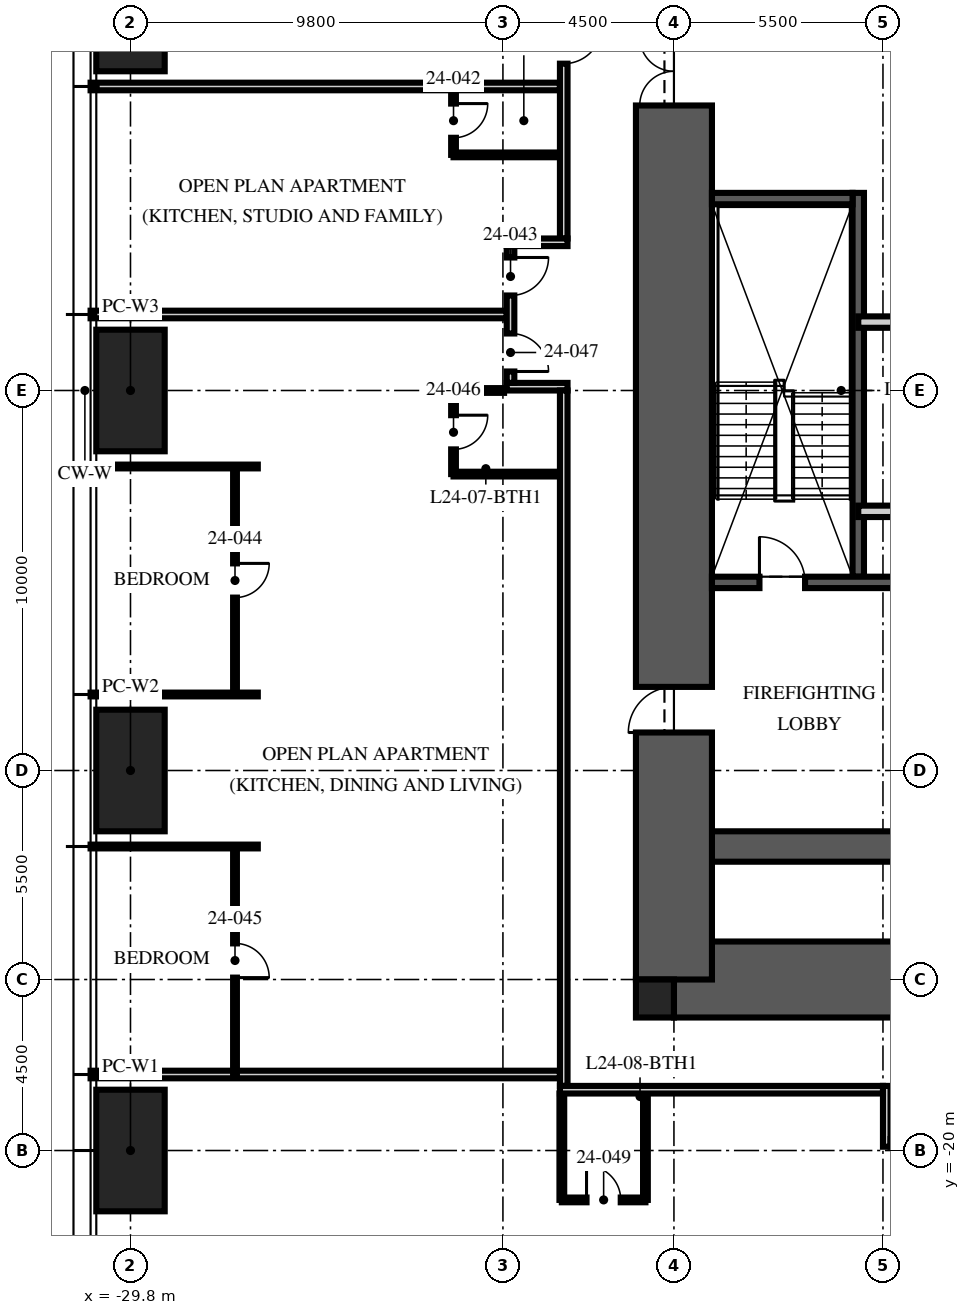
"""IFC4 building model, lengths in metres.
Left out: names, types, materials, properties, quantities, classifications, styles, units other than length and angle.
Written with IfcOpenShell. Run it as: python <this file> out.ifc"""

import sys

from ifc_helpers import new_model, si_unit, direction, frame, frame_2d, origin, origin_2d, place, context, subcontext, project, spatial, rectangle, hollow_rectangle, extrude, element, fill, save


model = new_model("IFC4")
c1 = context("Model", 3, precision=1e-05, world=origin(), true_north=direction((0.0, 1.0)))
c2 = subcontext(c1, "Body", "Model", "MODEL_VIEW")
j1 = project(units=[si_unit("LENGTHUNIT", "METRE"), si_unit("PLANEANGLEUNIT", "RADIAN")], contexts=[c1])
p1 = place(None, origin())
s1 = spatial("IfcSite", under=j1, at=p1, CompositionType="ELEMENT")
p2 = place(p1, origin())
s2 = spatial("IfcBuilding", under=s1, at=p2, CompositionType="ELEMENT")
p3 = place(p2, frame((0.0, 0.0, 96.0)))
s3 = spatial("IfcBuildingStorey", under=s2, at=p3, CompositionType="ELEMENT", Elevation=96.0)
p4 = place(p3, frame((-15.5, -15.5, -0.25), z_axis=(0.0, 0.0, 1.0), x_axis=(1.0, 0.0, 0.0)))
e1 = element("IfcWall", 1, at=p4, inside=s3, PredefinedType="SHEAR", context=c2, shape_type="SweptSolid", body=[
    extrude(rectangle(XDim=31.0, YDim=2.0, at=frame_2d((15.5, 0.0))), origin(), (0.0, 0.0, 1.0), 3.65),
])
p5 = place(p3, frame((-15.5, -12.0, -0.25), z_axis=(0.0, 0.0, 1.0), x_axis=(1.0, 0.0, 0.0)))
e2 = element("IfcWall", 2, at=p5, inside=s3, PredefinedType="SHEAR", context=c2, shape_type="SweptSolid", body=[
    extrude(rectangle(XDim=31.0, YDim=0.8, at=frame_2d((15.5, 0.0))), origin(), (0.0, 0.0, 1.0), 3.65),
])
p6 = place(p3, frame((-15.5, -15.5, -0.25), z_axis=(0.0, 0.0, 1.0), x_axis=(0.0, 1.0, 0.0)))
e3 = element("IfcWall", 3, at=p6, inside=s3, PredefinedType="SHEAR", context=c2, shape_type="SweptSolid", body=[
    extrude(rectangle(XDim=31.0, YDim=2.0, at=frame_2d((15.5, 0.0))), origin(), (0.0, 0.0, 1.0), 3.65),
])
p7 = place(p6, frame((6.5, 0.0, 0.25)))
e4 = element("IfcOpeningElement", 4, at=p7, cuts=e3, PredefinedType="OPENING", context=c2, shape_type="SweptSolid", body=[
    extrude(rectangle(XDim=1.2, YDim=2.1, at=frame_2d((0.6, 1.05))), frame((0.0, 1.01, 0.0), z_axis=(0.0, -1.0, 0.0), x_axis=(1.0, 0.0, 0.0)), (0.0, 0.0, 1.0), 2.02),
])
p8 = place(p6, frame((23.0, 0.0, 0.25)))
e5 = element("IfcOpeningElement", 5, at=p8, cuts=e3, PredefinedType="OPENING", context=c2, shape_type="SweptSolid", body=[
    extrude(rectangle(XDim=1.8, YDim=2.1, at=frame_2d((0.9, 1.05))), frame((0.0, 1.01, 0.0), z_axis=(0.0, -1.0, 0.0), x_axis=(1.0, 0.0, 0.0)), (0.0, 0.0, 1.0), 2.02),
])
p9 = place(p3, frame((-16.0, -16.0, -0.25), z_axis=(0.0, 0.0, 1.0), x_axis=(1.0, 0.0, 0.0)))
e6 = element("IfcColumn", 6, at=p9, inside=s3, PredefinedType="COLUMN", context=c2, shape_type="SweptSolid", body=[
    extrude(rectangle(XDim=1.0, YDim=1.0, at=origin_2d()), origin(), (0.0, 0.0, 1.0), 3.65),
])
p10 = place(p3, frame((-29.8, -20.0, 0.0), z_axis=(0.0, 0.0, 1.0), x_axis=(0.0, 1.0, 0.0)))
e7 = element("IfcColumn", 7, at=p10, inside=s3, PredefinedType="COLUMN", context=c2, shape_type="SweptSolid", body=[
    extrude(hollow_rectangle(XDim=3.2, YDim=1.8, WallThickness=0.2, at=origin_2d()), origin(), (0.0, 0.0, 1.0), 2.47),
])
p11 = place(p3, frame((-29.8, -10.0, 0.0), z_axis=(0.0, 0.0, 1.0), x_axis=(0.0, 1.0, 0.0)))
e8 = element("IfcColumn", 8, at=p11, inside=s3, PredefinedType="COLUMN", context=c2, shape_type="SweptSolid", body=[
    extrude(hollow_rectangle(XDim=3.2, YDim=1.8, WallThickness=0.2, at=origin_2d()), origin(), (0.0, 0.0, 1.0), 2.62),
])
p12 = place(p3, frame((-29.8, 0.0, 0.0), z_axis=(0.0, 0.0, 1.0), x_axis=(0.0, 1.0, 0.0)))
e9 = element("IfcColumn", 9, at=p12, inside=s3, PredefinedType="COLUMN", context=c2, shape_type="SweptSolid", body=[
    extrude(hollow_rectangle(XDim=3.2, YDim=1.8, WallThickness=0.2, at=origin_2d()), origin(), (0.0, 0.0, 1.0), 2.78),
])
p13 = place(p3, frame((-29.8, 10.0, 0.0), z_axis=(0.0, 0.0, 1.0), x_axis=(0.0, 1.0, 0.0)))
e10 = element("IfcColumn", 10, at=p13, inside=s3, PredefinedType="COLUMN", context=c2, shape_type="SweptSolid", body=[
    extrude(hollow_rectangle(XDim=3.2, YDim=1.8, WallThickness=0.2, at=origin_2d()), origin(), (0.0, 0.0, 1.0), 2.62),
])
p14 = place(p3, frame((-10.65, -4.9, 0.0), z_axis=(0.0, 0.0, 1.0), x_axis=(0.0, 1.0, 0.0)))
e11 = element("IfcWall", 11, at=p14, inside=s3, PredefinedType="SOLIDWALL", context=c2, shape_type="SweptSolid", body=[
    extrude(rectangle(XDim=10.1, YDim=0.3, at=frame_2d((5.05, 0.0))), origin(), (0.0, 0.0, 1.0), 3.4),
])
p15 = place(p3, frame((-14.5, -5.05, 0.0), z_axis=(0.0, 0.0, 1.0), x_axis=(1.0, 0.0, 0.0)))
e12 = element("IfcWall", 12, at=p15, inside=s3, PredefinedType="SOLIDWALL", context=c2, shape_type="SweptSolid", body=[
    extrude(rectangle(XDim=5.7, YDim=0.3, at=frame_2d((2.85, 0.0))), origin(), (0.0, 0.0, 1.0), 3.4),
])
p16 = place(p15, frame((1.25, 0.0, 0.0)))
e13 = element("IfcOpeningElement", 13, at=p16, cuts=e12, PredefinedType="OPENING", context=c2, shape_type="SweptSolid", body=[
    extrude(rectangle(XDim=1.2, YDim=2.1, at=frame_2d((0.6, 1.05))), frame((0.0, 0.16, 0.0), z_axis=(0.0, -1.0, 0.0), x_axis=(1.0, 0.0, 0.0)), (0.0, 0.0, 1.0), 0.32),
])
p17 = place(p3, frame((-14.5, 5.05, 0.0), z_axis=(0.0, 0.0, 1.0), x_axis=(1.0, 0.0, 0.0)))
e14 = element("IfcWall", 14, at=p17, inside=s3, PredefinedType="SOLIDWALL", context=c2, shape_type="SweptSolid", body=[
    extrude(rectangle(XDim=3.7, YDim=0.3, at=frame_2d((1.85, 0.0))), origin(), (0.0, 0.0, 1.0), 3.4),
])
p18 = place(p3, frame((-10.65, 1.8, 0.0), z_axis=(0.0, 0.0, 1.0), x_axis=(1.0, 0.0, 0.0)))
e15 = element("IfcWall", 15, at=p18, inside=s3, PredefinedType="PARTITIONING", context=c2, shape_type="SweptSolid", body=[
    extrude(rectangle(XDim=21.3, YDim=0.3, at=frame_2d((10.65, 0.0))), origin(), (0.0, 0.0, 1.0), 3.4),
])
p19 = place(p18, frame((10.05, 0.0, 0.0)))
e16 = element("IfcOpeningElement", 16, at=p19, cuts=e15, PredefinedType="OPENING", context=c2, shape_type="SweptSolid", body=[
    extrude(rectangle(XDim=1.2, YDim=2.1, at=frame_2d((0.6, 1.05))), frame((0.0, 0.16, 0.0), z_axis=(0.0, -1.0, 0.0), x_axis=(1.0, 0.0, 0.0)), (0.0, 0.0, 1.0), 0.32),
])
p20 = place(p18, frame((19.238, 0.0, 0.0)))
e17 = element("IfcOpeningElement", 17, at=p20, cuts=e15, PredefinedType="OPENING", context=c2, shape_type="SweptSolid", body=[
    extrude(rectangle(XDim=0.9, YDim=2.1, at=frame_2d((0.45, 1.05))), frame((0.0, 0.16, 0.0), z_axis=(0.0, -1.0, 0.0), x_axis=(1.0, 0.0, 0.0)), (0.0, 0.0, 1.0), 0.32),
])
p21 = place(p3, frame((-10.65, -3.18, 0.0), z_axis=(0.0, 0.0, 1.0), x_axis=(1.0, 0.0, 0.0)))
e18 = element("IfcWall", 18, at=p21, inside=s3, PredefinedType="PARTITIONING", context=c2, shape_type="SweptSolid", body=[
    extrude(rectangle(XDim=6.45, YDim=0.3, at=frame_2d((3.225, 0.0))), origin(), (0.0, 0.0, 1.0), 3.4),
])
p22 = place(p3, frame((-18.5, 8.0, 0.0), z_axis=(0.0, 0.0, 1.0), x_axis=(-1.0, 0.0, 0.0)))
e19 = element("IfcWall", 19, at=p22, inside=s3, PredefinedType="PARTITIONING", context=c2, shape_type="SweptSolid", body=[
    extrude(rectangle(XDim=12.35, YDim=0.2, at=frame_2d((6.175, 0.0))), origin(), (0.0, 0.0, 1.0), 2.7),
])
p23 = place(p3, frame((-19.9, 2.0, 0.0), z_axis=(0.0, 0.0, 1.0), x_axis=(-1.0, 0.0, 0.0)))
e20 = element("IfcWall", 20, at=p23, inside=s3, PredefinedType="PARTITIONING", context=c2, shape_type="SweptSolid", body=[
    extrude(rectangle(XDim=10.95, YDim=0.2, at=frame_2d((5.475, 0.0))), origin(), (0.0, 0.0, 1.0), 2.7),
])
for number, where, z_axis, x_axis in (
    (21, (-26.45, -2.0, 0.0), (0.0, 0.0, 1.0), (-1.0, 0.0, 0.0)),
    (22, (-26.45, -8.0, 0.0), (0.0, 0.0, 1.0), (-1.0, 0.0, 0.0)),
    (23, (-26.45, -12.0, 0.0), (0.0, 0.0, 1.0), (-1.0, 0.0, 0.0)),
):
    element("IfcWall", number, at=place(p3, frame(where, z_axis=z_axis, x_axis=x_axis)), inside=s3, PredefinedType="PARTITIONING", context=c2, shape_type="SweptSolid", body=[
        extrude(rectangle(XDim=4.4, YDim=0.1, at=frame_2d((2.2, 0.0))), origin(), (0.0, 0.0, 1.0), 2.7),
    ])
p24 = place(p3, frame((-18.5, -18.0, 0.0), z_axis=(0.0, 0.0, 1.0), x_axis=(-1.0, 0.0, 0.0)))
e24 = element("IfcWall", 24, at=p24, inside=s3, PredefinedType="PARTITIONING", context=c2, shape_type="SweptSolid", body=[
    extrude(rectangle(XDim=12.35, YDim=0.2, at=frame_2d((6.175, 0.0))), origin(), (0.0, 0.0, 1.0), 2.3),
])
p25 = place(p3, frame((-21.3, 8.0, 0.0), z_axis=(0.0, 0.0, 1.0), x_axis=(0.0, -1.0, 0.0)))
e25 = element("IfcWall", 25, at=p25, inside=s3, PredefinedType="PARTITIONING", context=c2, shape_type="SweptSolid", body=[
    extrude(rectangle(XDim=1.8, YDim=0.125, at=frame_2d((0.9, 0.0))), origin(), (0.0, 0.0, 1.0), 3.4),
])
p26 = place(p25, frame((0.45, 0.0, 0.0)))
e26 = element("IfcOpeningElement", 26, at=p26, cuts=e25, PredefinedType="OPENING", context=c2, shape_type="SweptSolid", body=[
    extrude(rectangle(XDim=0.9, YDim=2.1, at=frame_2d((0.45, 1.05))), frame((0.0, 0.073, 0.0), z_axis=(0.0, -1.0, 0.0), x_axis=(1.0, 0.0, 0.0)), (0.0, 0.0, 1.0), 0.145),
])
p27 = place(p3, frame((-18.5, 6.2, 0.0), z_axis=(0.0, 0.0, 1.0), x_axis=(-1.0, 0.0, 0.0)))
e27 = element("IfcWall", 27, at=p27, inside=s3, PredefinedType="PARTITIONING", context=c2, shape_type="SweptSolid", body=[
    extrude(rectangle(XDim=2.8, YDim=0.125, at=frame_2d((1.4, 0.0))), origin(), (0.0, 0.0, 1.0), 3.4),
])
p28 = place(p3, frame((-27.05, -2.0, 0.0), z_axis=(0.0, 0.0, 1.0), x_axis=(0.0, -1.0, 0.0)))
e28 = element("IfcWall", 28, at=p28, inside=s3, PredefinedType="PARTITIONING", context=c2, shape_type="SweptSolid", body=[
    extrude(rectangle(XDim=6.0, YDim=0.1, at=frame_2d((3.0, 0.0))), origin(), (0.0, 0.0, 1.0), 2.2),
])
p29 = place(p28, frame((2.55, 0.0, 0.0)))
e29 = element("IfcOpeningElement", 29, at=p29, cuts=e28, PredefinedType="OPENING", context=c2, shape_type="SweptSolid", body=[
    extrude(rectangle(XDim=0.9, YDim=2.1, at=frame_2d((0.45, 1.05))), frame((0.0, 0.06, 0.0), z_axis=(0.0, -1.0, 0.0), x_axis=(1.0, 0.0, 0.0)), (0.0, 0.0, 1.0), 0.12),
])
p30 = place(p3, frame((-27.05, -12.0, 0.0), z_axis=(0.0, 0.0, 1.0), x_axis=(0.0, -1.0, 0.0)))
e30 = element("IfcWall", 30, at=p30, inside=s3, PredefinedType="PARTITIONING", context=c2, shape_type="SweptSolid", body=[
    extrude(rectangle(XDim=6.0, YDim=0.1, at=frame_2d((3.0, 0.0))), origin(), (0.0, 0.0, 1.0), 2.2),
])
p31 = place(p30, frame((2.55, 0.0, 0.0)))
e31 = element("IfcOpeningElement", 31, at=p31, cuts=e30, PredefinedType="OPENING", context=c2, shape_type="SweptSolid", body=[
    extrude(rectangle(XDim=0.9, YDim=2.1, at=frame_2d((0.45, 1.05))), frame((0.0, 0.06, 0.0), z_axis=(0.0, -1.0, 0.0), x_axis=(1.0, 0.0, 0.0)), (0.0, 0.0, 1.0), 0.12),
])
p32 = place(p3, frame((-21.3, 0.0, 0.0), z_axis=(0.0, 0.0, 1.0), x_axis=(0.0, -1.0, 0.0)))
e32 = element("IfcWall", 32, at=p32, inside=s3, PredefinedType="PARTITIONING", context=c2, shape_type="SweptSolid", body=[
    extrude(rectangle(XDim=2.2, YDim=0.125, at=frame_2d((1.1, 0.0))), origin(), (0.0, 0.0, 1.0), 2.3),
])
p33 = place(p32, frame((0.65, 0.0, 0.0)))
e33 = element("IfcOpeningElement", 33, at=p33, cuts=e32, PredefinedType="OPENING", context=c2, shape_type="SweptSolid", body=[
    extrude(rectangle(XDim=0.9, YDim=2.1, at=frame_2d((0.45, 1.05))), frame((0.0, 0.073, 0.0), z_axis=(0.0, -1.0, 0.0), x_axis=(1.0, 0.0, 0.0)), (0.0, 0.0, 1.0), 0.145),
])
p34 = place(p3, frame((-19.97, 0.0, 0.0), z_axis=(0.0, 0.0, 1.0), x_axis=(-1.0, 0.0, 0.0)))
e34 = element("IfcWall", 34, at=p34, inside=s3, PredefinedType="PARTITIONING", context=c2, shape_type="SweptSolid", body=[
    extrude(rectangle(XDim=1.33, YDim=0.125, at=frame_2d((0.665, 0.0))), origin(), (0.0, 0.0, 1.0), 2.3),
])
p35 = place(p3, frame((-18.5, -2.2, 0.0), z_axis=(0.0, 0.0, 1.0), x_axis=(-1.0, 0.0, 0.0)))
e35 = element("IfcWall", 35, at=p35, inside=s3, PredefinedType="PARTITIONING", context=c2, shape_type="SweptSolid", body=[
    extrude(rectangle(XDim=2.8, YDim=0.125, at=frame_2d((1.4, 0.0))), origin(), (0.0, 0.0, 1.0), 3.4),
])
p36 = place(p3, frame((-18.45, -21.3, 0.0), z_axis=(0.0, 0.0, 1.0), x_axis=(1.0, 0.0, 0.0)))
e36 = element("IfcWall", 36, at=p36, inside=s3, PredefinedType="PARTITIONING", context=c2, shape_type="SweptSolid", body=[
    extrude(rectangle(XDim=2.2, YDim=0.125, at=frame_2d((1.1, 0.0))), origin(), (0.0, 0.0, 1.0), 3.4),
])
p37 = place(p36, frame((0.65, 0.0, 0.0)))
e37 = element("IfcOpeningElement", 37, at=p37, cuts=e36, PredefinedType="OPENING", context=c2, shape_type="SweptSolid", body=[
    extrude(rectangle(XDim=0.9, YDim=2.1, at=frame_2d((0.45, 1.05))), frame((0.0, 0.073, 0.0), z_axis=(0.0, -1.0, 0.0), x_axis=(1.0, 0.0, 0.0)), (0.0, 0.0, 1.0), 0.145),
])
p38 = place(p3, frame((-18.45, -18.5, 0.0), z_axis=(0.0, 0.0, 1.0), x_axis=(0.0, -1.0, 0.0)))
e38 = element("IfcWall", 38, at=p38, inside=s3, PredefinedType="PARTITIONING", context=c2, shape_type="SweptSolid", body=[
    extrude(rectangle(XDim=2.8, YDim=0.125, at=frame_2d((1.4, 0.0))), origin(), (0.0, 0.0, 1.0), 2.3),
])
p39 = place(p3, frame((-16.25, -18.5, 0.0), z_axis=(0.0, 0.0, 1.0), x_axis=(0.0, -1.0, 0.0)))
e39 = element("IfcWall", 39, at=p39, inside=s3, PredefinedType="PARTITIONING", context=c2, shape_type="SweptSolid", body=[
    extrude(rectangle(XDim=2.8, YDim=0.125, at=frame_2d((1.4, 0.0))), origin(), (0.0, 0.0, 1.0), 3.4),
])
p40 = place(p3, frame((-18.4, 18.3, 0.0), z_axis=(0.0, 0.0, 1.0), x_axis=(0.0, -1.0, 0.0)))
e40 = element("IfcWall", 40, at=p40, inside=s3, PredefinedType="PARTITIONING", context=c2, shape_type="SweptSolid", body=[
    extrude(rectangle(XDim=14.3, YDim=0.2, at=frame_2d((7.15, 0.0))), origin(), (0.0, 0.0, 1.0), 2.2),
])
p41 = place(p40, frame((8.7, 0.0, 0.0)))
e41 = element("IfcOpeningElement", 41, at=p41, cuts=e40, PredefinedType="OPENING", context=c2, shape_type="SweptSolid", body=[
    extrude(rectangle(XDim=1.0, YDim=2.2, at=frame_2d((0.5, 1.1))), frame((0.0, 0.11, 0.0), z_axis=(0.0, -1.0, 0.0), x_axis=(1.0, 0.0, 0.0)), (0.0, 0.0, 1.0), 0.22),
])
p42 = place(p3, frame((-18.3, 3.9, 0.0), z_axis=(0.0, 0.0, 1.0), x_axis=(-1.0, 0.0, 0.0)))
e42 = element("IfcWall", 42, at=p42, inside=s3, PredefinedType="PARTITIONING", context=c2, shape_type="SweptSolid", body=[
    extrude(rectangle(XDim=1.6, YDim=0.2, at=frame_2d((0.8, 0.0))), origin(), (0.0, 0.0, 1.0), 3.4),
])
p43 = place(p3, frame((-18.3, 0.1, 0.0), z_axis=(0.0, 0.0, 1.0), x_axis=(-1.0, 0.0, 0.0)))
e43 = element("IfcWall", 43, at=p43, inside=s3, PredefinedType="PARTITIONING", context=c2, shape_type="SweptSolid", body=[
    extrude(rectangle(XDim=1.6, YDim=0.2, at=frame_2d((0.8, 0.0))), origin(), (0.0, 0.0, 1.0), 2.3),
])
p44 = place(p3, frame((-19.8, 3.8, 0.0), z_axis=(0.0, 0.0, 1.0), x_axis=(0.0, -1.0, 0.0)))
e44 = element("IfcWall", 44, at=p44, inside=s3, PredefinedType="PARTITIONING", context=c2, shape_type="SweptSolid", body=[
    extrude(rectangle(XDim=3.6, YDim=0.2, at=frame_2d((1.8, 0.0))), origin(), (0.0, 0.0, 1.0), 2.3),
])
p45 = place(p44, frame((0.3, 0.0, 0.0)))
e45 = element("IfcOpeningElement", 45, at=p45, cuts=e44, PredefinedType="OPENING", context=c2, shape_type="SweptSolid", body=[
    extrude(rectangle(XDim=1.0, YDim=2.2, at=frame_2d((0.5, 1.1))), frame((0.0, 0.11, 0.0), z_axis=(0.0, -1.0, 0.0), x_axis=(1.0, 0.0, 0.0)), (0.0, 0.0, 1.0), 0.22),
])
p46 = place(p44, frame((2.3, 0.0, 0.0)))
e46 = element("IfcOpeningElement", 46, at=p46, cuts=e44, PredefinedType="OPENING", context=c2, shape_type="SweptSolid", body=[
    extrude(rectangle(XDim=1.0, YDim=2.2, at=frame_2d((0.5, 1.1))), frame((0.0, 0.11, 0.0), z_axis=(0.0, -1.0, 0.0), x_axis=(1.0, 0.0, 0.0)), (0.0, 0.0, 1.0), 0.22),
])
p47 = place(p3, frame((-18.4, 0.0, 0.0), z_axis=(0.0, 0.0, 1.0), x_axis=(0.0, -1.0, 0.0)))
e47 = element("IfcWall", 47, at=p47, inside=s3, PredefinedType="PARTITIONING", context=c2, shape_type="SweptSolid", body=[
    extrude(rectangle(XDim=18.3, YDim=0.2, at=frame_2d((9.15, 0.0))), origin(), (0.0, 0.0, 1.0), 2.2),
])
p48 = place(p3, frame((-9.9, -18.3, 0.0), z_axis=(0.0, 0.0, 1.0), x_axis=(0.0, -1.0, 0.0)))
e48 = element("IfcWall", 48, at=p48, inside=s3, PredefinedType="PARTITIONING", context=c2, shape_type="SweptSolid", body=[
    extrude(rectangle(XDim=1.6, YDim=0.2, at=frame_2d((0.8, 0.0))), origin(), (0.0, 0.0, 1.0), 2.3),
])
p49 = place(p3, frame((-10.0, -18.4, 0.0), z_axis=(0.0, 0.0, 1.0), x_axis=(-1.0, 0.0, 0.0)))
e49 = element("IfcWall", 49, at=p49, inside=s3, PredefinedType="PARTITIONING", context=c2, shape_type="SweptSolid", body=[
    extrude(rectangle(XDim=8.5, YDim=0.2, at=frame_2d((4.25, 0.0))), origin(), (0.0, 0.0, 1.0), 2.2),
])
p50 = place(p16, origin())
e50 = element("IfcDoor", 50, at=p50, inside=s3, OperationType="SINGLE_SWING_LEFT", PredefinedType="DOOR", context=c2, shape_type="SweptSolid", body=[
    extrude(rectangle(XDim=1.2, YDim=2.1, at=frame_2d((0.6, 1.05))), frame((0.0, 0.025, 0.0), z_axis=(0.0, -1.0, 0.0), x_axis=(1.0, 0.0, 0.0)), (0.0, 0.0, 1.0), 0.05),
])
fill(e13, e50)
p51 = place(p7, origin())
e51 = element("IfcDoor", 51, at=p51, inside=s3, OperationType="SINGLE_SWING_LEFT", PredefinedType="DOOR", context=c2, shape_type="SweptSolid", body=[
    extrude(rectangle(XDim=1.2, YDim=2.1, at=frame_2d((0.6, 1.05))), frame((0.0, 0.025, 0.0), z_axis=(0.0, -1.0, 0.0), x_axis=(1.0, 0.0, 0.0)), (0.0, 0.0, 1.0), 0.05),
])
fill(e4, e51)
p52 = place(p8, origin())
e52 = element("IfcDoor", 52, at=p52, inside=s3, OperationType="DOUBLE_DOOR_SINGLE_SWING", PredefinedType="DOOR", context=c2, shape_type="SweptSolid", body=[
    extrude(rectangle(XDim=1.8, YDim=2.1, at=frame_2d((0.9, 1.05))), frame((0.0, 0.025, 0.0), z_axis=(0.0, -1.0, 0.0), x_axis=(1.0, 0.0, 0.0)), (0.0, 0.0, 1.0), 0.05),
])
fill(e5, e52)
p53 = place(p41, origin())
e53 = element("IfcDoor", 53, at=p53, inside=s3, OperationType="SINGLE_SWING_LEFT", PredefinedType="DOOR", context=c2, shape_type="SweptSolid", body=[
    extrude(rectangle(XDim=1.0, YDim=2.2, at=frame_2d((0.5, 1.1))), frame((0.0, 0.025, 0.0), z_axis=(0.0, -1.0, 0.0), x_axis=(1.0, 0.0, 0.0)), (0.0, 0.0, 1.0), 0.05),
])
fill(e41, e53)
p54 = place(p26, origin())
e54 = element("IfcDoor", 54, at=p54, inside=s3, OperationType="SINGLE_SWING_LEFT", PredefinedType="DOOR", context=c2, shape_type="SweptSolid", body=[
    extrude(rectangle(XDim=0.9, YDim=2.1, at=frame_2d((0.45, 1.05))), frame((0.0, 0.025, 0.0), z_axis=(0.0, -1.0, 0.0), x_axis=(1.0, 0.0, 0.0)), (0.0, 0.0, 1.0), 0.05),
])
fill(e26, e54)
p55 = place(p45, origin())
e55 = element("IfcDoor", 55, at=p55, inside=s3, OperationType="SINGLE_SWING_LEFT", PredefinedType="DOOR", context=c2, shape_type="SweptSolid", body=[
    extrude(rectangle(XDim=1.0, YDim=2.2, at=frame_2d((0.5, 1.1))), frame((0.0, 0.025, 0.0), z_axis=(0.0, -1.0, 0.0), x_axis=(1.0, 0.0, 0.0)), (0.0, 0.0, 1.0), 0.05),
])
fill(e45, e55)
p56 = place(p29, origin())
e56 = element("IfcDoor", 56, at=p56, inside=s3, OperationType="SINGLE_SWING_LEFT", PredefinedType="DOOR", context=c2, shape_type="SweptSolid", body=[
    extrude(rectangle(XDim=0.9, YDim=2.1, at=frame_2d((0.45, 1.05))), frame((0.0, 0.025, 0.0), z_axis=(0.0, -1.0, 0.0), x_axis=(1.0, 0.0, 0.0)), (0.0, 0.0, 1.0), 0.05),
])
fill(e29, e56)
p57 = place(p31, origin())
e57 = element("IfcDoor", 57, at=p57, inside=s3, OperationType="SINGLE_SWING_RIGHT", PredefinedType="DOOR", context=c2, shape_type="SweptSolid", body=[
    extrude(rectangle(XDim=0.9, YDim=2.1, at=frame_2d((0.45, 1.05))), frame((0.0, 0.025, 0.0), z_axis=(0.0, -1.0, 0.0), x_axis=(1.0, 0.0, 0.0)), (0.0, 0.0, 1.0), 0.05),
])
fill(e31, e57)
p58 = place(p33, origin())
e58 = element("IfcDoor", 58, at=p58, inside=s3, OperationType="SINGLE_SWING_LEFT", PredefinedType="DOOR", context=c2, shape_type="SweptSolid", body=[
    extrude(rectangle(XDim=0.9, YDim=2.1, at=frame_2d((0.45, 1.05))), frame((0.0, 0.025, 0.0), z_axis=(0.0, -1.0, 0.0), x_axis=(1.0, 0.0, 0.0)), (0.0, 0.0, 1.0), 0.05),
])
fill(e33, e58)
p59 = place(p46, origin())
e59 = element("IfcDoor", 59, at=p59, inside=s3, OperationType="SINGLE_SWING_RIGHT", PredefinedType="DOOR", context=c2, shape_type="SweptSolid", body=[
    extrude(rectangle(XDim=1.0, YDim=2.2, at=frame_2d((0.5, 1.1))), frame((0.0, 0.025, 0.0), z_axis=(0.0, -1.0, 0.0), x_axis=(1.0, 0.0, 0.0)), (0.0, 0.0, 1.0), 0.05),
])
fill(e46, e59)
p60 = place(p37, origin())
e60 = element("IfcDoor", 60, at=p60, inside=s3, OperationType="SINGLE_SWING_LEFT", PredefinedType="DOOR", context=c2, shape_type="SweptSolid", body=[
    extrude(rectangle(XDim=0.9, YDim=2.1, at=frame_2d((0.45, 1.05))), frame((0.0, 0.025, 0.0), z_axis=(0.0, -1.0, 0.0), x_axis=(1.0, 0.0, 0.0)), (0.0, 0.0, 1.0), 0.05),
])
fill(e37, e60)
save(model, sys.argv[1])
